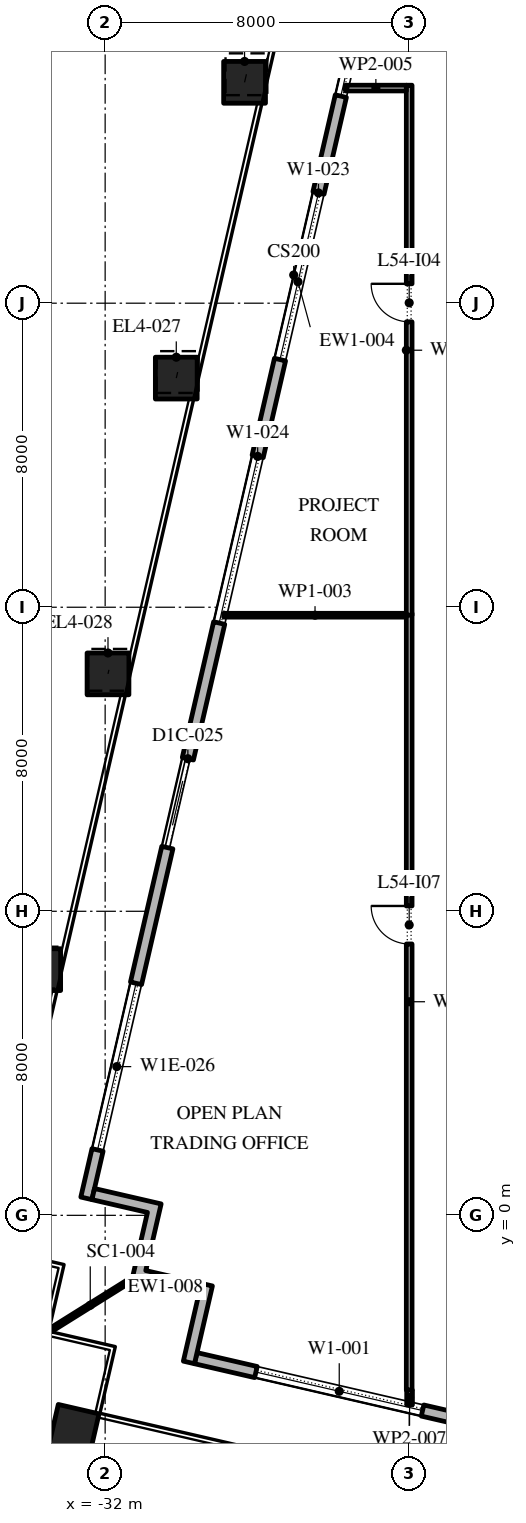
"""IFC4 building model, lengths in metres.
Left out: names, types, materials, properties, quantities, classifications, styles, units other than length and angle.
Written with IfcOpenShell. Run it as: python <this file> out.ifc"""

import sys

from ifc_helpers import new_model, si_unit, direction, frame, frame_2d, origin, origin_2d, place, context, subcontext, project, spatial, polyline, rectangle, outline, extrude, element, fill, save


model = new_model("IFC4")
c1 = context("Model", 3, precision=1e-05, world=origin(), true_north=direction((0.0, 1.0)))
c2 = subcontext(c1, "Body", "Model", "MODEL_VIEW")
j1 = project(units=[si_unit("LENGTHUNIT", "METRE"), si_unit("PLANEANGLEUNIT", "RADIAN")], contexts=[c1])
p1 = place(None, origin())
s1 = spatial("IfcSite", under=j1, at=p1, CompositionType="ELEMENT")
p2 = place(p1, origin())
s2 = spatial("IfcBuilding", under=s1, at=p2, CompositionType="ELEMENT")
p3 = place(p2, frame((0.0, 0.0, 251.4)))
s3 = spatial("IfcBuildingStorey", under=s2, at=p3, CompositionType="ELEMENT", Elevation=251.4)
p4 = place(p3, frame((-32.821, -5.635, 0.0), z_axis=(0.0, 0.0, 1.0), x_axis=(0.974370064785, -0.224951054344, 0.0)))
e1 = element("IfcColumn", 1, at=p4, inside=s3, PredefinedType="COLUMN", context=c2, shape_type="SweptSolid", body=[
    extrude(rectangle(XDim=1.1, YDim=1.1, at=origin_2d()), origin(), (0.0, 0.0, 1.0), 4.2),
])
p5 = place(p3, frame((-28.332, 29.811, 0.0), z_axis=(0.011667624972, 0.050501660328, 0.998655821007), x_axis=(-0.974334539389, 0.225104876342, 0.0)))
e2 = element("IfcColumn", 2, at=p5, inside=s3, PredefinedType="COLUMN", context=c2, shape_type="SweptSolid", body=[
    extrude(rectangle(XDim=1.1, YDim=1.1, at=origin_2d()), origin(), (0.0, 0.0, 1.0), 4.206),
])
p6 = place(p3, frame((-30.128, 22.029, 0.0), z_axis=(0.008770375651, 0.037927518544, 0.999242004646), x_axis=(-0.974290512438, 0.225295355862, 0.0)))
e3 = element("IfcColumn", 3, at=p6, inside=s3, PredefinedType="COLUMN", context=c2, shape_type="SweptSolid", body=[
    extrude(rectangle(XDim=1.1, YDim=1.1, at=origin_2d()), origin(), (0.0, 0.0, 1.0), 4.203),
])
p7 = place(p3, frame((-31.925, 14.247, 0.0), z_axis=(0.005868750925, 0.02527630349, 0.999663276431), x_axis=(-0.974088391429, 0.226167649504, 0.0)))
e4 = element("IfcColumn", 4, at=p7, inside=s3, PredefinedType="COLUMN", context=c2, shape_type="SweptSolid", body=[
    extrude(rectangle(XDim=1.1, YDim=1.1, at=origin_2d()), origin(), (0.0, 0.0, 1.0), 4.202),
])
p8 = place(p3, frame((-33.722, 6.464, 0.0), z_axis=(0.002906057426, 0.012612289227, 0.999916238987), x_axis=(-0.974466825284, 0.224531526563, 0.0)))
e5 = element("IfcColumn", 5, at=p8, inside=s3, PredefinedType="COLUMN", context=c2, shape_type="SweptSolid", body=[
    extrude(rectangle(XDim=1.1, YDim=1.1, at=origin_2d()), origin(), (0.0, 0.0, 1.0), 4.2),
])
p9 = place(p3, frame((-29.616, -3.758, 0.0), z_axis=(0.0, 0.0, 1.0), x_axis=(0.974370532314, -0.224949029246, 0.0)))
e6 = element("IfcWall", 6, at=p9, inside=s3, PredefinedType="STANDARD", context=c2, shape_type="SweptSolid", body=[
    extrude(rectangle(XDim=48.0, YDim=0.3, at=frame_2d((24.0, 0.0))), origin(), (0.0, 0.0, 1.0), 4.0),
])
p10 = place(p9, frame((1.625, 0.0, 0.45)))
e7 = element("IfcOpeningElement", 7, at=p10, cuts=e6, PredefinedType="OPENING", context=c2, shape_type="SweptSolid", body=[
    extrude(rectangle(XDim=4.5, YDim=3.05, at=frame_2d((2.25, 1.525))), frame((0.0, 0.16, 0.0), z_axis=(0.0, -1.0, 0.0), x_axis=(1.0, 0.0, 0.0)), (0.0, 0.0, 1.0), 0.32),
])
p11 = place(p9, frame((10.575, 0.0, 0.0)))
e8 = element("IfcOpeningElement", 8, at=p11, cuts=e6, PredefinedType="OPENING", context=c2, shape_type="SweptSolid", body=[
    extrude(rectangle(XDim=2.4, YDim=3.5, at=frame_2d((1.2, 1.75))), frame((0.0, 0.16, 0.0), z_axis=(0.0, -1.0, 0.0), x_axis=(1.0, 0.0, 0.0)), (0.0, 0.0, 1.0), 0.32),
])
p12 = place(p9, frame((17.575, 0.0, 0.45)))
e9 = element("IfcOpeningElement", 9, at=p12, cuts=e6, PredefinedType="OPENING", context=c2, shape_type="SweptSolid", body=[
    extrude(rectangle(XDim=4.5, YDim=3.0, at=frame_2d((2.25, 1.5))), frame((0.0, 0.16, 0.0), z_axis=(0.0, -1.0, 0.0), x_axis=(1.0, 0.0, 0.0)), (0.0, 0.0, 1.0), 0.32),
])
p13 = place(p9, frame((25.625, 0.0, 0.45)))
e10 = element("IfcOpeningElement", 10, at=p13, cuts=e6, PredefinedType="OPENING", context=c2, shape_type="SweptSolid", body=[
    extrude(rectangle(XDim=4.5, YDim=3.05, at=frame_2d((2.25, 1.525))), frame((0.0, 0.16, 0.0), z_axis=(0.0, -1.0, 0.0), x_axis=(1.0, 0.0, 0.0)), (0.0, 0.0, 1.0), 0.32),
])
p14 = place(p9, frame((33.675, 0.0, 0.45)))
e11 = element("IfcOpeningElement", 11, at=p14, cuts=e6, PredefinedType="OPENING", context=c2, shape_type="SweptSolid", body=[
    extrude(rectangle(XDim=4.5, YDim=2.825, at=frame_2d((2.25, 1.413))), frame((0.0, 0.16, 0.0), z_axis=(0.0, -1.0, 0.0), x_axis=(1.0, 0.0, 0.0)), (0.0, 0.0, 1.0), 0.32),
])
p15 = place(p9, frame((42.775, 0.0, 0.0)))
e12 = element("IfcOpeningElement", 12, at=p15, cuts=e6, PredefinedType="OPENING", context=c2, shape_type="SweptSolid", body=[
    extrude(rectangle(XDim=2.4, YDim=3.5, at=frame_2d((1.2, 1.75))), frame((0.0, 0.16, 0.0), z_axis=(0.0, -1.0, 0.0), x_axis=(1.0, 0.0, 0.0)), (0.0, 0.0, 1.0), 0.32),
])
p16 = place(p3, frame((-21.359, 48.678, 0.0), z_axis=(0.0, 0.0, 1.0), x_axis=(-0.224949198343, -0.974370493275, 0.0)))
e13 = element("IfcWall", 13, at=p16, inside=s3, PredefinedType="STANDARD", context=c2, shape_type="SweptSolid", body=[
    extrude(rectangle(XDim=49.5, YDim=0.3, at=frame_2d((24.75, 0.0))), origin(), (0.0, 0.0, 1.0), 4.0),
])
p17 = place(p16, frame((1.157, 0.0, 0.45)))
e14 = element("IfcOpeningElement", 14, at=p17, cuts=e13, PredefinedType="OPENING", context=c2, shape_type="SweptSolid", body=[
    extrude(rectangle(XDim=4.5, YDim=3.05, at=frame_2d((2.25, 1.525))), frame((0.0, 0.16, 0.0), z_axis=(0.0, -1.0, 0.0), x_axis=(1.0, 0.0, 0.0)), (0.0, 0.0, 1.0), 0.32),
])
p18 = place(p16, frame((9.171, 0.0, 0.0)))
e15 = element("IfcOpeningElement", 15, at=p18, cuts=e13, PredefinedType="OPENING", context=c2, shape_type="SweptSolid", body=[
    extrude(rectangle(XDim=2.4, YDim=3.5, at=frame_2d((1.2, 1.75))), frame((0.0, 0.16, 0.0), z_axis=(0.0, -1.0, 0.0), x_axis=(1.0, 0.0, 0.0)), (0.0, 0.0, 1.0), 0.32),
])
p19 = place(p16, frame((15.236, 0.0, 0.45)))
e16 = element("IfcOpeningElement", 16, at=p19, cuts=e13, PredefinedType="OPENING", context=c2, shape_type="SweptSolid", body=[
    extrude(rectangle(XDim=4.5, YDim=3.05, at=frame_2d((2.25, 1.525))), frame((0.0, 0.16, 0.0), z_axis=(0.0, -1.0, 0.0), x_axis=(1.0, 0.0, 0.0)), (0.0, 0.0, 1.0), 0.32),
])
p20 = place(p16, frame((22.35, 0.0, 0.45)))
e17 = element("IfcOpeningElement", 17, at=p20, cuts=e13, PredefinedType="OPENING", context=c2, shape_type="SweptSolid", body=[
    extrude(rectangle(XDim=4.5, YDim=3.05, at=frame_2d((2.25, 1.525))), frame((0.0, 0.16, 0.0), z_axis=(0.0, -1.0, 0.0), x_axis=(1.0, 0.0, 0.0)), (0.0, 0.0, 1.0), 0.32),
])
p21 = place(p16, frame((29.464, 0.0, 0.45)))
e18 = element("IfcOpeningElement", 18, at=p21, cuts=e13, PredefinedType="OPENING", context=c2, shape_type="SweptSolid", body=[
    extrude(rectangle(XDim=4.5, YDim=3.05, at=frame_2d((2.25, 1.525))), frame((0.0, 0.16, 0.0), z_axis=(0.0, -1.0, 0.0), x_axis=(1.0, 0.0, 0.0)), (0.0, 0.0, 1.0), 0.32),
])
p22 = place(p16, frame((37.628, 0.0, 0.0)))
e19 = element("IfcOpeningElement", 19, at=p22, cuts=e13, PredefinedType="OPENING", context=c2, shape_type="SweptSolid", body=[
    extrude(rectangle(XDim=2.4, YDim=3.325, at=frame_2d((1.2, 1.663))), frame((0.0, 0.16, 0.0), z_axis=(0.0, -1.0, 0.0), x_axis=(1.0, 0.0, 0.0)), (0.0, 0.0, 1.0), 0.32),
])
p23 = place(p16, frame((43.693, 0.0, 0.45)))
e20 = element("IfcOpeningElement", 20, at=p23, cuts=e13, PredefinedType="OPENING", context=c2, shape_type="SweptSolid", body=[
    extrude(rectangle(XDim=4.5, YDim=2.825, at=frame_2d((2.25, 1.413))), frame((0.0, 0.16, 0.0), z_axis=(0.0, -1.0, 0.0), x_axis=(1.0, 0.0, 0.0)), (0.0, 0.0, 1.0), 0.32),
])
p24 = place(p3, origin())
e21 = element("IfcWall", 21, at=p24, inside=s3, PredefinedType="STANDARD", context=c2, shape_type="SweptSolid", body=[
    extrude(outline(polyline([(-31.291, -1.678), (-30.886, 0.076), (-32.348, 0.413), (-32.28, 0.705), (-30.526, 0.301), (-30.931, -1.453), (-29.177, -1.858), (-29.65, -3.905), (-29.942, -3.837), (-29.537, -2.083), (-31.291, -1.678)])), origin(), (0.0, 0.0, 1.0), 4.0),
])
p25 = place(p3, frame((-31.291, -1.678, -0.05), z_axis=(0.0, 0.0, 1.0), x_axis=(-0.84807753525, -0.529872148923, 0.0)))
e22 = element("IfcWall", 22, at=p25, inside=s3, PredefinedType="STANDARD", context=c2, shape_type="SweptSolid", body=[
    extrude(rectangle(XDim=2.596, YDim=0.1, at=frame_2d((1.298, 0.0))), origin(), (0.0, 0.0, 1.0), 4.05),
])
p26 = place(p3, frame((-24.0, -4.6, 0.0), z_axis=(0.0, 0.0, 1.0), x_axis=(0.0, 1.0, 0.0)))
e23 = element("IfcWall", 23, at=p26, inside=s3, PredefinedType="PARTITIONING", context=c2, shape_type="SweptSolid", body=[
    extrude(rectangle(XDim=20.44, YDim=0.15, at=frame_2d((10.22, 0.0))), origin(), (0.0, 0.0, 1.0), 4.0),
])
p27 = place(p26, frame((11.74, 0.0, 0.0)))
e24 = element("IfcOpeningElement", 24, at=p27, cuts=e23, PredefinedType="OPENING", context=c2, shape_type="SweptSolid", body=[
    extrude(rectangle(XDim=1.0, YDim=2.1, at=frame_2d((0.5, 1.05))), frame((0.0, 0.085, 0.0), z_axis=(0.0, -1.0, 0.0), x_axis=(1.0, 0.0, 0.0)), (0.0, 0.0, 1.0), 0.17),
])
p28 = place(p3, frame((-24.075, 15.79, 0.0), z_axis=(0.0, 0.0, 1.0), x_axis=(-1.0, 0.0, 0.0)))
e25 = element("IfcWall", 25, at=p28, inside=s3, PredefinedType="PARTITIONING", context=c2, shape_type="SweptSolid", body=[
    extrude(rectangle(XDim=4.805, YDim=0.1, at=frame_2d((2.402, 0.0))), origin(), (0.0, 0.0, 1.0), 4.0),
])
p29 = place(p3, frame((-24.0, 15.79, 0.0), z_axis=(0.0, 0.0, 1.0), x_axis=(0.0, 1.0, 0.0)))
e26 = element("IfcWall", 26, at=p29, inside=s3, PredefinedType="PARTITIONING", context=c2, shape_type="SweptSolid", body=[
    extrude(rectangle(XDim=13.945, YDim=0.15, at=frame_2d((6.973, 0.0))), origin(), (0.0, 0.0, 1.0), 4.0),
])
p30 = place(p29, frame((7.72, 0.0, 0.0)))
e27 = element("IfcOpeningElement", 27, at=p30, cuts=e26, PredefinedType="OPENING", context=c2, shape_type="SweptSolid", body=[
    extrude(rectangle(XDim=1.0, YDim=2.1, at=frame_2d((0.5, 1.05))), frame((0.0, 0.085, 0.0), z_axis=(0.0, -1.0, 0.0), x_axis=(1.0, 0.0, 0.0)), (0.0, 0.0, 1.0), 0.17),
])
p31 = place(p3, frame((-24.075, 29.66, 0.0), z_axis=(0.0, 0.0, 1.0), x_axis=(-1.0, 0.0, 0.0)))
e28 = element("IfcWall", 28, at=p31, inside=s3, PredefinedType="PARTITIONING", context=c2, shape_type="SweptSolid", body=[
    extrude(rectangle(XDim=1.603, YDim=0.15, at=frame_2d((0.802, 0.0))), origin(), (0.0, 0.0, 1.0), 4.0),
])
p32 = place(p3, frame((-23.99, -4.986, 0.0), z_axis=(0.0, 0.0, 1.0), x_axis=(0.0, 1.0, 0.0)))
e29 = element("IfcWall", 29, at=p32, inside=s3, PredefinedType="PARTITIONING", context=c2, shape_type="SweptSolid", body=[
    extrude(rectangle(XDim=0.386, YDim=0.15, at=frame_2d((0.193, 0.0))), origin(), (0.0, 0.0, 1.0), 4.0),
])
p33 = place(p10, origin())
e30 = element("IfcWindow", 30, at=p33, inside=s3, PartitioningType="DOUBLE_PANEL_VERTICAL", PredefinedType="WINDOW", context=c2, shape_type="SweptSolid", body=[
    extrude(rectangle(XDim=4.5, YDim=3.05, at=frame_2d((2.25, 1.525))), frame((0.0, 0.03, 0.0), z_axis=(0.0, -1.0, 0.0), x_axis=(1.0, 0.0, 0.0)), (0.0, 0.0, 1.0), 0.06),
])
fill(e7, e30)
p34 = place(p19, origin())
e31 = element("IfcWindow", 31, at=p34, inside=s3, PartitioningType="DOUBLE_PANEL_VERTICAL", PredefinedType="WINDOW", context=c2, shape_type="SweptSolid", body=[
    extrude(rectangle(XDim=4.5, YDim=3.05, at=frame_2d((2.25, 1.525))), frame((0.0, 0.03, 0.0), z_axis=(0.0, -1.0, 0.0), x_axis=(1.0, 0.0, 0.0)), (0.0, 0.0, 1.0), 0.06),
])
fill(e16, e31)
p35 = place(p20, origin())
e32 = element("IfcWindow", 32, at=p35, inside=s3, PartitioningType="DOUBLE_PANEL_VERTICAL", PredefinedType="WINDOW", context=c2, shape_type="SweptSolid", body=[
    extrude(rectangle(XDim=4.5, YDim=3.05, at=frame_2d((2.25, 1.525))), frame((0.0, 0.03, 0.0), z_axis=(0.0, -1.0, 0.0), x_axis=(1.0, 0.0, 0.0)), (0.0, 0.0, 1.0), 0.06),
])
fill(e17, e32)
p36 = place(p21, origin())
e33 = element("IfcWindow", 33, at=p36, inside=s3, PartitioningType="DOUBLE_PANEL_VERTICAL", PredefinedType="WINDOW", context=c2, shape_type="SweptSolid", body=[
    extrude(rectangle(XDim=4.5, YDim=3.05, at=frame_2d((2.25, 1.525))), frame((0.0, 0.03, 0.0), z_axis=(0.0, -1.0, 0.0), x_axis=(1.0, 0.0, 0.0)), (0.0, 0.0, 1.0), 0.06),
])
fill(e18, e33)
p37 = place(p22, origin())
e34 = element("IfcDoor", 34, at=p37, inside=s3, OperationType="DOUBLE_DOOR_SLIDING", PredefinedType="DOOR", context=c2, shape_type="SweptSolid", body=[
    extrude(rectangle(XDim=2.4, YDim=3.325, at=frame_2d((1.2, 1.663))), frame((0.0, 0.025, 0.0), z_axis=(0.0, -1.0, 0.0), x_axis=(1.0, 0.0, 0.0)), (0.0, 0.0, 1.0), 0.05),
])
fill(e19, e34)
p38 = place(p23, origin())
e35 = element("IfcWindow", 35, at=p38, inside=s3, PartitioningType="DOUBLE_PANEL_VERTICAL", PredefinedType="WINDOW", context=c2, shape_type="SweptSolid", body=[
    extrude(rectangle(XDim=4.5, YDim=2.825, at=frame_2d((2.25, 1.413))), frame((0.0, 0.03, 0.0), z_axis=(0.0, -1.0, 0.0), x_axis=(1.0, 0.0, 0.0)), (0.0, 0.0, 1.0), 0.06),
])
fill(e20, e35)
p39 = place(p30, origin())
e36 = element("IfcDoor", 36, at=p39, inside=s3, OperationType="SINGLE_SWING_LEFT", PredefinedType="DOOR", context=c2, shape_type="SweptSolid", body=[
    extrude(rectangle(XDim=1.0, YDim=2.1, at=frame_2d((0.5, 1.05))), frame((0.0, 0.025, 0.0), z_axis=(0.0, -1.0, 0.0), x_axis=(1.0, 0.0, 0.0)), (0.0, 0.0, 1.0), 0.05),
])
fill(e27, e36)
p40 = place(p27, origin())
e37 = element("IfcDoor", 37, at=p40, inside=s3, OperationType="SINGLE_SWING_LEFT", PredefinedType="DOOR", context=c2, shape_type="SweptSolid", body=[
    extrude(rectangle(XDim=1.0, YDim=2.1, at=frame_2d((0.5, 1.05))), frame((0.0, 0.025, 0.0), z_axis=(0.0, -1.0, 0.0), x_axis=(1.0, 0.0, 0.0)), (0.0, 0.0, 1.0), 0.05),
])
fill(e24, e37)
save(model, sys.argv[1])
